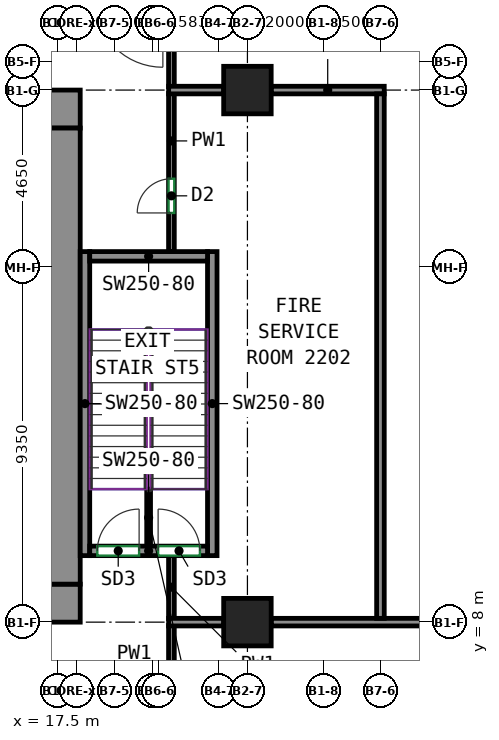
"""IFC4 building model, lengths in metres.
Left out: names, types, materials, properties, quantities, classifications, styles, units other than length and angle.
Written with IfcOpenShell. Run it as: python <this file> out.ifc"""

import sys

from ifc_helpers import new_model, si_unit, direction, frame, frame_2d, origin, origin_2d, place, context, subcontext, project, spatial, rectangle, extrude, source, transform, mapped, element, fill, save


model = new_model("IFC4")
c1 = context("Model", 3, precision=1e-05, world=origin(), true_north=direction((0.0, 1.0)))
c2 = subcontext(c1, "Body", "Model", "MODEL_VIEW")
j1 = project(units=[si_unit("LENGTHUNIT", "METRE"), si_unit("PLANEANGLEUNIT", "RADIAN")], contexts=[c1])
p1 = place(None, origin())
s1 = spatial("IfcSite", under=j1, at=p1, CompositionType="ELEMENT")
p2 = place(p1, origin())
s2 = spatial("IfcBuilding", under=s1, at=p2, CompositionType="ELEMENT")
p3 = place(p2, frame((0.0, 0.0, 95.2)))
s3 = spatial("IfcBuildingStorey", under=s2, at=p3, CompositionType="ELEMENT", Elevation=95.2)
m1 = source(origin(), c2, "Body", "SweptSolid", [
    extrude(rectangle(XDim=1.25, YDim=1.25, at=origin_2d()), origin(), (0.0, 0.0, 1.0), 3.5),
])
p4 = place(p3, frame((22.5, 8.0, 0.0), z_axis=(0.0, 0.0, 1.0), x_axis=(1.0, 0.0, 0.0)))
e1 = element("IfcColumn", 1, at=p4, inside=s3, PredefinedType="COLUMN", context=c2, shape_type="MappedRepresentation", body=[
    mapped(m1, transform((0.0, 0.0, 0.0))),
])
m2 = source(origin(), c2, "Body", "SweptSolid", [
    extrude(rectangle(XDim=1.25, YDim=1.25, at=origin_2d()), origin(), (0.0, 0.0, 1.0), 5.0),
])
p5 = place(p3, frame((22.5, 22.0, 0.0), z_axis=(0.0, 0.0, 1.0), x_axis=(1.0, 0.0, 0.0)))
e2 = element("IfcColumn", 2, at=p5, inside=s3, PredefinedType="COLUMN", context=c2, shape_type="MappedRepresentation", body=[
    mapped(m2, transform((0.0, 0.0, 0.0))),
])
m3 = source(origin(), c2, "Body", "SweptSolid", [
    extrude(rectangle(XDim=5.63, YDim=1.0, at=frame_2d((2.815, 0.0))), origin(), (0.0, 0.0, 1.0), 5.0),
])
p6 = place(p3, frame((12.47, 8.5, 0.0), z_axis=(0.0, 0.0, 1.0), x_axis=(1.0, 0.0, 0.0)))
e3 = element("IfcWall", 3, at=p6, inside=s3, PredefinedType="SHEAR", context=c2, shape_type="MappedRepresentation", body=[
    mapped(m3, transform((0.0, 0.0, 0.0))),
])
p7 = place(p6, frame((1.28, 0.0, 0.0)))
e4 = element("IfcOpeningElement", 4, at=p7, cuts=e3, PredefinedType="OPENING", context=c2, shape_type="SweptSolid", body=[
    extrude(rectangle(XDim=1.1, YDim=2.1, at=frame_2d((0.55, 1.05))), frame((0.0, 0.51, 0.0), z_axis=(0.0, -1.0, 0.0), x_axis=(1.0, 0.0, 0.0)), (0.0, 0.0, 1.0), 1.02),
])
p8 = place(p6, frame((3.18, 0.0, 0.0)))
e5 = element("IfcOpeningElement", 5, at=p8, cuts=e3, PredefinedType="OPENING", context=c2, shape_type="SweptSolid", body=[
    extrude(rectangle(XDim=1.1, YDim=2.1, at=frame_2d((0.55, 1.05))), frame((0.0, 0.51, 0.0), z_axis=(0.0, -1.0, 0.0), x_axis=(1.0, 0.0, 0.0)), (0.0, 0.0, 1.0), 1.02),
])
m4 = source(origin(), c2, "Body", "SweptSolid", [
    extrude(rectangle(XDim=34.1, YDim=1.0, at=frame_2d((17.05, 0.0))), origin(), (0.0, 0.0, 1.0), 5.0),
])
p9 = place(p3, frame((-16.0, 21.5, 0.0), z_axis=(0.0, 0.0, 1.0), x_axis=(1.0, 0.0, 0.0)))
e6 = element("IfcWall", 6, at=p9, inside=s3, PredefinedType="SHEAR", context=c2, shape_type="MappedRepresentation", body=[
    mapped(m4, transform((0.0, 0.0, 0.0))),
])
p10 = place(p9, frame((6.831, 0.0, 0.0)))
e7 = element("IfcOpeningElement", 7, at=p10, cuts=e6, PredefinedType="OPENING", context=c2, shape_type="SweptSolid", body=[
    extrude(rectangle(XDim=0.9, YDim=2.1, at=frame_2d((0.45, 1.05))), frame((0.0, 0.51, 0.0), z_axis=(0.0, -1.0, 0.0), x_axis=(1.0, 0.0, 0.0)), (0.0, 0.0, 1.0), 1.02),
])
p11 = place(p9, frame((12.138, 0.0, 0.0)))
e8 = element("IfcOpeningElement", 8, at=p11, cuts=e6, PredefinedType="OPENING", context=c2, shape_type="SweptSolid", body=[
    extrude(rectangle(XDim=0.9, YDim=2.1, at=frame_2d((0.45, 1.05))), frame((0.0, 0.51, 0.0), z_axis=(0.0, -1.0, 0.0), x_axis=(1.0, 0.0, 0.0)), (0.0, 0.0, 1.0), 1.02),
])
p12 = place(p9, frame((17.565, 0.0, 0.0)))
e9 = element("IfcOpeningElement", 9, at=p12, cuts=e6, PredefinedType="OPENING", context=c2, shape_type="SweptSolid", body=[
    extrude(rectangle(XDim=0.9, YDim=2.1, at=frame_2d((0.45, 1.05))), frame((0.0, 0.51, 0.0), z_axis=(0.0, -1.0, 0.0), x_axis=(1.0, 0.0, 0.0)), (0.0, 0.0, 1.0), 1.02),
])
p13 = place(p9, frame((21.786, 0.0, 0.0)))
e10 = element("IfcOpeningElement", 10, at=p13, cuts=e6, PredefinedType="OPENING", context=c2, shape_type="SweptSolid", body=[
    extrude(rectangle(XDim=0.9, YDim=2.1, at=frame_2d((0.45, 1.05))), frame((0.0, 0.51, 0.0), z_axis=(0.0, -1.0, 0.0), x_axis=(1.0, 0.0, 0.0)), (0.0, 0.0, 1.0), 1.02),
])
p14 = place(p9, frame((26.127, 0.0, 0.0)))
e11 = element("IfcOpeningElement", 11, at=p14, cuts=e6, PredefinedType="OPENING", context=c2, shape_type="SweptSolid", body=[
    extrude(rectangle(XDim=0.9, YDim=2.1, at=frame_2d((0.45, 1.05))), frame((0.0, 0.51, 0.0), z_axis=(0.0, -1.0, 0.0), x_axis=(1.0, 0.0, 0.0)), (0.0, 0.0, 1.0), 1.02),
])
p15 = place(p9, frame((2.525, 0.0, 0.0)))
e12 = element("IfcOpeningElement", 12, at=p15, cuts=e6, PredefinedType="OPENING", context=c2, shape_type="SweptSolid", body=[
    extrude(rectangle(XDim=0.9, YDim=2.1, at=frame_2d((0.45, 1.05))), frame((0.0, 0.51, 0.0), z_axis=(0.0, -1.0, 0.0), x_axis=(1.0, 0.0, 0.0)), (0.0, 0.0, 1.0), 1.02),
])
p16 = place(p9, frame((30.675, 0.0, 0.0)))
e13 = element("IfcOpeningElement", 13, at=p16, cuts=e6, PredefinedType="OPENING", context=c2, shape_type="SweptSolid", body=[
    extrude(rectangle(XDim=0.9, YDim=2.1, at=frame_2d((0.45, 1.05))), frame((0.0, 0.51, 0.0), z_axis=(0.0, -1.0, 0.0), x_axis=(1.0, 0.0, 0.0)), (0.0, 0.0, 1.0), 1.02),
])
m5 = source(origin(), c2, "Body", "SweptSolid", [
    extrude(rectangle(XDim=12.0, YDim=1.0, at=frame_2d((6.0, 0.0))), origin(), (0.0, 0.0, 1.0), 5.0),
])
p17 = place(p3, frame((17.6, 9.0, 0.0), z_axis=(0.0, 0.0, 1.0), x_axis=(0.0, 1.0, 0.0)))
e14 = element("IfcWall", 14, at=p17, inside=s3, PredefinedType="SHEAR", context=c2, shape_type="MappedRepresentation", body=[
    mapped(m5, transform((0.0, 0.0, 0.0))),
])
m6 = source(origin(), c2, "Body", "SweptSolid", [
    extrude(rectangle(XDim=8.0, YDim=0.25, at=frame_2d((4.0, 0.0))), origin(), (0.0, 0.0, 1.0), 5.0),
])
for number, where, z_axis, x_axis in (
    (15, (18.225, 9.75, 0.0), (0.0, 0.0, 1.0), (0.0, 1.0, 0.0)),
    (16, (21.575, 9.75, 0.0), (0.0, 0.0, 1.0), (0.0, 1.0, 0.0)),
):
    element("IfcWall", number, at=place(p3, frame(where, z_axis=z_axis, x_axis=x_axis)), inside=s3, PredefinedType="SHEAR", context=c2, shape_type="MappedRepresentation", body=[
        mapped(m6, transform((0.0, 0.0, 0.0))),
    ])
m7 = source(origin(), c2, "Body", "SweptSolid", [
    extrude(rectangle(XDim=3.1, YDim=0.25, at=frame_2d((1.55, 0.0))), origin(), (0.0, 0.0, 1.0), 5.0),
])
p18 = place(p3, frame((18.35, 9.875, 0.0), z_axis=(0.0, 0.0, 1.0), x_axis=(1.0, 0.0, 0.0)))
e17 = element("IfcWall", 17, at=p18, inside=s3, PredefinedType="SHEAR", context=c2, shape_type="MappedRepresentation", body=[
    mapped(m7, transform((0.0, 0.0, 0.0))),
])
p19 = place(p18, frame((0.2, 0.0, 0.0)))
e18 = element("IfcOpeningElement", 18, at=p19, cuts=e17, PredefinedType="OPENING", context=c2, shape_type="SweptSolid", body=[
    extrude(rectangle(XDim=1.1, YDim=2.1, at=frame_2d((0.55, 1.05))), frame((0.0, 0.135, 0.0), z_axis=(0.0, -1.0, 0.0), x_axis=(1.0, 0.0, 0.0)), (0.0, 0.0, 1.0), 0.27),
])
p20 = place(p18, frame((1.8, 0.0, 0.0)))
e19 = element("IfcOpeningElement", 19, at=p20, cuts=e17, PredefinedType="OPENING", context=c2, shape_type="SweptSolid", body=[
    extrude(rectangle(XDim=1.1, YDim=2.1, at=frame_2d((0.55, 1.05))), frame((0.0, 0.135, 0.0), z_axis=(0.0, -1.0, 0.0), x_axis=(1.0, 0.0, 0.0)), (0.0, 0.0, 1.0), 0.27),
])
p21 = place(p3, frame((18.35, 17.625, 0.0), z_axis=(0.0, 0.0, 1.0), x_axis=(1.0, 0.0, 0.0)))
e20 = element("IfcWall", 20, at=p21, inside=s3, PredefinedType="SHEAR", context=c2, shape_type="MappedRepresentation", body=[
    mapped(m7, transform((0.0, 0.0, 0.0))),
])
m8 = source(origin(), c2, "Body", "SweptSolid", [
    extrude(rectangle(XDim=1.5, YDim=0.1, at=frame_2d((0.75, 0.0))), origin(), (0.0, 0.0, 1.0), 5.0),
])
p22 = place(p3, frame((19.9, 10.0, 0.0), z_axis=(0.0, 0.0, 1.0), x_axis=(0.0, 1.0, 0.0)))
e21 = element("IfcWall", 21, at=p22, inside=s3, PredefinedType="PARTITIONING", context=c2, shape_type="MappedRepresentation", body=[
    mapped(m8, transform((0.0, 0.0, 0.0))),
])
p23 = place(p3, frame((20.5, 3.475, 0.0), z_axis=(0.0, 0.0, 1.0), x_axis=(0.0, 1.0, 0.0)))
e22 = element("IfcWall", 22, at=p23, inside=s3, PredefinedType="PARTITIONING", context=c2, shape_type="SweptSolid", body=[
    extrude(rectangle(XDim=4.435, YDim=0.15, at=frame_2d((2.217, 0.0))), origin(), (0.0, 0.0, 1.0), 5.0),
])
p24 = place(p23, frame((0.302, 0.0, 0.0)))
e23 = element("IfcOpeningElement", 23, at=p24, cuts=e22, PredefinedType="OPENING", context=c2, shape_type="SweptSolid", body=[
    extrude(rectangle(XDim=1.8, YDim=2.1, at=frame_2d((0.9, 1.05))), frame((0.0, 0.085, 0.0), z_axis=(0.0, -1.0, 0.0), x_axis=(1.0, 0.0, 0.0)), (0.0, 0.0, 1.0), 0.17),
])
p25 = place(p3, frame((20.5, 17.75, 0.0), z_axis=(0.0, 0.0, 1.0), x_axis=(0.0, 1.0, 0.0)))
e24 = element("IfcWall", 24, at=p25, inside=s3, PredefinedType="PARTITIONING", context=c2, shape_type="SweptSolid", body=[
    extrude(rectangle(XDim=4.16, YDim=0.15, at=frame_2d((2.08, 0.0))), origin(), (0.0, 0.0, 1.0), 5.0),
])
p26 = place(p25, frame((1.017, 0.0, 0.0)))
e25 = element("IfcOpeningElement", 25, at=p26, cuts=e24, PredefinedType="OPENING", context=c2, shape_type="SweptSolid", body=[
    extrude(rectangle(XDim=0.9, YDim=2.1, at=frame_2d((0.45, 1.05))), frame((0.0, 0.085, 0.0), z_axis=(0.0, -1.0, 0.0), x_axis=(1.0, 0.0, 0.0)), (0.0, 0.0, 1.0), 0.17),
])
p27 = place(p3, frame((20.5, 8.09, 0.0), z_axis=(0.0, 0.0, 1.0), x_axis=(0.0, 1.0, 0.0)))
e26 = element("IfcWall", 26, at=p27, inside=s3, PredefinedType="PARTITIONING", context=c2, shape_type="SweptSolid", body=[
    extrude(rectangle(XDim=1.66, YDim=0.15, at=frame_2d((0.83, 0.0))), origin(), (0.0, 0.0, 1.0), 5.0),
])
p28 = place(p3, frame((20.5, 22.09, 0.0), z_axis=(0.0, 0.0, 1.0), x_axis=(0.0, 1.0, 0.0)))
e27 = element("IfcWall", 27, at=p28, inside=s3, PredefinedType="PARTITIONING", context=c2, shape_type="SweptSolid", body=[
    extrude(rectangle(XDim=2.235, YDim=0.15, at=frame_2d((1.117, 0.0))), origin(), (0.0, 0.0, 1.0), 5.0),
])
p29 = place(p3, frame((20.427, 8.0, 0.0), z_axis=(0.0, 0.0, 1.0), x_axis=(1.0, 0.0, 0.0)))
e28 = element("IfcWall", 28, at=p29, inside=s3, PredefinedType="PARTITIONING", context=c2, shape_type="SweptSolid", body=[
    extrude(rectangle(XDim=1.448, YDim=0.2, at=frame_2d((0.724, 0.0))), origin(), (0.0, 0.0, 1.0), 5.0),
])
p30 = place(p3, frame((23.125, 8.0, 0.0), z_axis=(0.0, 0.0, 1.0), x_axis=(1.0, 0.0, 0.0)))
e29 = element("IfcWall", 29, at=p30, inside=s3, PredefinedType="PARTITIONING", context=c2, shape_type="SweptSolid", body=[
    extrude(rectangle(XDim=8.975, YDim=0.2, at=frame_2d((4.488, 0.0))), origin(), (0.0, 0.0, 1.0), 4.35),
])
p31 = place(p3, frame((20.427, 22.0, 0.0), z_axis=(0.0, 0.0, 1.0), x_axis=(1.0, 0.0, 0.0)))
e30 = element("IfcWall", 30, at=p31, inside=s3, PredefinedType="PARTITIONING", context=c2, shape_type="SweptSolid", body=[
    extrude(rectangle(XDim=1.448, YDim=0.2, at=frame_2d((0.724, 0.0))), origin(), (0.0, 0.0, 1.0), 5.0),
])
p32 = place(p3, frame((23.125, 22.0, 0.0), z_axis=(0.0, 0.0, 1.0), x_axis=(1.0, 0.0, 0.0)))
e31 = element("IfcWall", 31, at=p32, inside=s3, PredefinedType="PARTITIONING", context=c2, shape_type="SweptSolid", body=[
    extrude(rectangle(XDim=2.975, YDim=0.2, at=frame_2d((1.488, 0.0))), origin(), (0.0, 0.0, 1.0), 4.35),
])
p33 = place(p3, frame((26.0, 8.1, 0.0), z_axis=(0.0, 0.0, 1.0), x_axis=(0.0, 1.0, 0.0)))
e32 = element("IfcWall", 32, at=p33, inside=s3, PredefinedType="PARTITIONING", context=c2, shape_type="SweptSolid", body=[
    extrude(rectangle(XDim=13.8, YDim=0.2, at=frame_2d((6.9, 0.0))), origin(), (0.0, 0.0, 1.0), 5.0),
])
p34 = place(p19, origin())
e33 = element("IfcDoor", 33, at=p34, inside=s3, OperationType="SINGLE_SWING_RIGHT", PredefinedType="DOOR", context=c2, shape_type="SweptSolid", body=[
    extrude(rectangle(XDim=1.1, YDim=2.1, at=frame_2d((0.55, 1.05))), frame((0.0, 0.025, 0.0), z_axis=(0.0, -1.0, 0.0), x_axis=(1.0, 0.0, 0.0)), (0.0, 0.0, 1.0), 0.05),
])
fill(e18, e33)
p35 = place(p20, origin())
e34 = element("IfcDoor", 34, at=p35, inside=s3, OperationType="SINGLE_SWING_LEFT", PredefinedType="DOOR", context=c2, shape_type="SweptSolid", body=[
    extrude(rectangle(XDim=1.1, YDim=2.1, at=frame_2d((0.55, 1.05))), frame((0.0, 0.025, 0.0), z_axis=(0.0, -1.0, 0.0), x_axis=(1.0, 0.0, 0.0)), (0.0, 0.0, 1.0), 0.05),
])
fill(e19, e34)
p36 = place(p26, origin())
e35 = element("IfcDoor", 35, at=p36, inside=s3, OperationType="SINGLE_SWING_LEFT", PredefinedType="DOOR", context=c2, shape_type="SweptSolid", body=[
    extrude(rectangle(XDim=0.9, YDim=2.1, at=frame_2d((0.45, 1.05))), frame((0.0, 0.025, 0.0), z_axis=(0.0, -1.0, 0.0), x_axis=(1.0, 0.0, 0.0)), (0.0, 0.0, 1.0), 0.05),
])
fill(e25, e35)
save(model, sys.argv[1])
